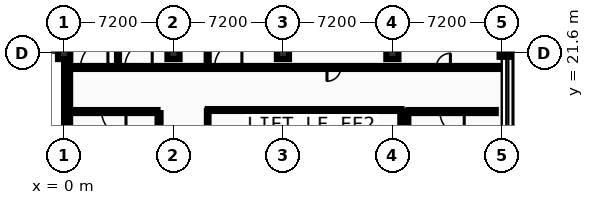
"""IFC4 building model, lengths in metres.
Left out: names, types, materials, properties, quantities, classifications, styles, units other than length and angle.
Written with IfcOpenShell. Run it as: python <this file> out.ifc"""

import sys

from ifc_helpers import new_model, si_unit, direction, frame, frame_2d, origin, origin_2d, place, context, subcontext, project, spatial, rectangle, i_section, extrude, element, fill, save


model = new_model("IFC4")
c1 = context("Model", 3, precision=1e-05, world=origin(), true_north=direction((0.0, 1.0)))
c2 = subcontext(c1, "Body", "Model", "MODEL_VIEW")
j1 = project(units=[si_unit("LENGTHUNIT", "METRE"), si_unit("PLANEANGLEUNIT", "RADIAN")], contexts=[c1])
p1 = place(None, origin())
s1 = spatial("IfcSite", under=j1, at=p1, CompositionType="ELEMENT")
p2 = place(p1, origin())
s2 = spatial("IfcBuilding", under=s1, at=p2, CompositionType="ELEMENT")
p3 = place(p2, frame((0.0, 0.0, -4.8)))
s3 = spatial("IfcBuildingStorey", under=s2, at=p3, CompositionType="ELEMENT", Elevation=-4.8)
for number, where, z_axis, x_axis in (
    (1, (0.0, 21.6, 0.0), (0.0, 0.0, 1.0), (1.0, 0.0, 0.0)),
    (2, (7.2, 21.6, 0.0), (0.0, 0.0, 1.0), (1.0, 0.0, 0.0)),
    (3, (14.4, 21.6, 0.0), (0.0, 0.0, 1.0), (1.0, 0.0, 0.0)),
    (4, (21.6, 21.6, 0.0), (0.0, 0.0, 1.0), (1.0, 0.0, 0.0)),
):
    element("IfcColumn", number, at=place(p3, frame(where, z_axis=z_axis, x_axis=x_axis)), inside=s3, PredefinedType="COLUMN", context=c2, shape_type="SweptSolid", body=[
        extrude(rectangle(XDim=0.8, YDim=0.8, at=origin_2d()), origin(), (0.0, 0.0, 1.0), 4.8),
    ])
for number, where, z_axis, x_axis in (
    (5, (28.8, 21.6, 0.0), (0.0, 0.0, 1.0), (1.0, 0.0, 0.0)),
    (6, (29.52, 21.6, 0.0), (0.0, 0.0, 1.0), (1.0, 0.0, 0.0)),
):
    element("IfcColumn", number, at=place(p3, frame(where, z_axis=z_axis, x_axis=x_axis)), inside=s3, PredefinedType="COLUMN", context=c2, shape_type="SweptSolid", body=[
        extrude(i_section(OverallWidth=0.3, OverallDepth=0.5, WebThickness=0.014, FlangeThickness=0.028, FilletRadius=0.027, at=origin_2d()), origin(), (0.0, 0.0, 1.0), 4.8),
    ])
p4 = place(p3, frame((0.2, 81.6, 0.0), z_axis=(0.0, 0.0, 1.0), x_axis=(0.0, -1.0, 0.0)))
e7 = element("IfcWall", 7, at=p4, inside=s3, PredefinedType="USERDEFINED", context=c2, shape_type="SweptSolid", body=[
    extrude(rectangle(XDim=81.2, YDim=0.4, at=frame_2d((40.6, 0.0))), origin(), (0.0, 0.0, 1.0), 4.545),
])
p5 = place(p3, frame((0.4, 17.75, 0.0), z_axis=(0.0, 0.0, 1.0), x_axis=(1.0, 0.0, 0.0)))
e8 = element("IfcWall", 8, at=p5, inside=s3, PredefinedType="PARTITIONING", context=c2, shape_type="SweptSolid", body=[
    extrude(rectangle(XDim=5.75, YDim=0.2, at=frame_2d((2.875, 0.0))), origin(), (0.0, 0.0, 1.0), 4.545),
])
p6 = place(p5, frame((2.075, 0.0, 0.0)))
e9 = element("IfcOpeningElement", 9, at=p6, cuts=e8, PredefinedType="OPENING", context=c2, shape_type="SweptSolid", body=[
    extrude(rectangle(XDim=1.6, YDim=2.2, at=frame_2d((0.8, 1.1))), frame((0.0, 0.11, 0.0), z_axis=(0.0, -1.0, 0.0), x_axis=(1.0, 0.0, 0.0)), (0.0, 0.0, 1.0), 0.22),
])
p7 = place(p3, frame((6.25, 14.45, 0.0), z_axis=(0.0, 0.0, 1.0), x_axis=(0.0, 1.0, 0.0)))
e10 = element("IfcWall", 10, at=p7, inside=s3, PredefinedType="PARTITIONING", context=c2, shape_type="SweptSolid", body=[
    extrude(rectangle(XDim=3.2, YDim=0.2, at=frame_2d((1.6, 0.0))), origin(), (0.0, 0.0, 1.0), 4.545),
])
p8 = place(p3, frame((22.65, 17.75, 0.0), z_axis=(0.0, 0.0, 1.0), x_axis=(1.0, 0.0, 0.0)))
e11 = element("IfcWall", 11, at=p8, inside=s3, PredefinedType="PARTITIONING", context=c2, shape_type="SweptSolid", body=[
    extrude(rectangle(XDim=5.75, YDim=0.2, at=frame_2d((2.875, 0.0))), origin(), (0.0, 0.0, 1.0), 4.545),
])
p9 = place(p8, frame((2.075, 0.0, 0.0)))
e12 = element("IfcOpeningElement", 12, at=p9, cuts=e11, PredefinedType="OPENING", context=c2, shape_type="SweptSolid", body=[
    extrude(rectangle(XDim=1.6, YDim=2.2, at=frame_2d((0.8, 1.1))), frame((0.0, 0.11, 0.0), z_axis=(0.0, -1.0, 0.0), x_axis=(1.0, 0.0, 0.0)), (0.0, 0.0, 1.0), 0.22),
])
p10 = place(p3, frame((22.55, 14.45, 0.0), z_axis=(0.0, 0.0, 1.0), x_axis=(0.0, 1.0, 0.0)))
e13 = element("IfcWall", 13, at=p10, inside=s3, PredefinedType="PARTITIONING", context=c2, shape_type="SweptSolid", body=[
    extrude(rectangle(XDim=3.2, YDim=0.2, at=frame_2d((1.6, 0.0))), origin(), (0.0, 0.0, 1.0), 4.545),
])
p11 = place(p3, frame((9.45, 17.85, 0.0), z_axis=(0.0, 0.0, 1.0), x_axis=(1.0, 0.0, 0.0)))
e14 = element("IfcWall", 14, at=p11, inside=s3, PredefinedType="PARTITIONING", context=c2, shape_type="SweptSolid", body=[
    extrude(rectangle(XDim=12.75, YDim=0.125, at=frame_2d((6.375, 0.0))), origin(), (0.0, 0.0, 1.0), 4.545),
])
p12 = place(p11, frame((1.225, 0.0, 0.0)))
e15 = element("IfcOpeningElement", 15, at=p12, cuts=e14, PredefinedType="OPENING", context=c2, shape_type="SweptSolid", body=[
    extrude(rectangle(XDim=1.0, YDim=2.1, at=frame_2d((0.5, 1.05))), frame((0.0, 0.073, 0.0), z_axis=(0.0, -1.0, 0.0), x_axis=(1.0, 0.0, 0.0)), (0.0, 0.0, 1.0), 0.145),
])
p13 = place(p11, frame((6.25, 0.0, 0.0)))
e16 = element("IfcOpeningElement", 16, at=p13, cuts=e14, PredefinedType="OPENING", context=c2, shape_type="SweptSolid", body=[
    extrude(rectangle(XDim=0.9, YDim=2.1, at=frame_2d((0.45, 1.05))), frame((0.0, 0.073, 0.0), z_axis=(0.0, -1.0, 0.0), x_axis=(1.0, 0.0, 0.0)), (0.0, 0.0, 1.0), 0.145),
])
p14 = place(p11, frame((8.05, 0.0, 0.0)))
e17 = element("IfcOpeningElement", 17, at=p14, cuts=e14, PredefinedType="OPENING", context=c2, shape_type="SweptSolid", body=[
    extrude(rectangle(XDim=0.88, YDim=2.04, at=frame_2d((0.44, 1.02))), frame((0.0, 0.073, 0.0), z_axis=(0.0, -1.0, 0.0), x_axis=(1.0, 0.0, 0.0)), (0.0, 0.0, 1.0), 0.145),
])
p15 = place(p3, frame((0.42, 20.65, 0.0), z_axis=(0.0, 0.0, 1.0), x_axis=(1.0, 0.0, 0.0)))
e18 = element("IfcWall", 18, at=p15, inside=s3, PredefinedType="PARTITIONING", context=c2, shape_type="SweptSolid", body=[
    extrude(rectangle(XDim=28.18, YDim=0.2, at=frame_2d((14.09, 0.0))), origin(), (0.0, 0.0, 1.0), 4.545),
])
p16 = place(p15, frame((0.665, 0.0, 0.0)))
e19 = element("IfcOpeningElement", 19, at=p16, cuts=e18, PredefinedType="OPENING", context=c2, shape_type="SweptSolid", body=[
    extrude(rectangle(XDim=1.8, YDim=2.3, at=frame_2d((0.9, 1.15))), frame((0.0, 0.11, 0.0), z_axis=(0.0, -1.0, 0.0), x_axis=(1.0, 0.0, 0.0)), (0.0, 0.0, 1.0), 0.22),
])
p17 = place(p15, frame((9.48, 0.0, 0.0)))
e20 = element("IfcOpeningElement", 20, at=p17, cuts=e18, PredefinedType="OPENING", context=c2, shape_type="SweptSolid", body=[
    extrude(rectangle(XDim=1.8, YDim=2.3, at=frame_2d((0.9, 1.15))), frame((0.0, 0.11, 0.0), z_axis=(0.0, -1.0, 0.0), x_axis=(1.0, 0.0, 0.0)), (0.0, 0.0, 1.0), 0.22),
])
p18 = place(p15, frame((3.58, 0.0, 0.0)))
e21 = element("IfcOpeningElement", 21, at=p18, cuts=e18, PredefinedType="OPENING", context=c2, shape_type="SweptSolid", body=[
    extrude(rectangle(XDim=1.8, YDim=2.3, at=frame_2d((0.9, 1.15))), frame((0.0, 0.11, 0.0), z_axis=(0.0, -1.0, 0.0), x_axis=(1.0, 0.0, 0.0)), (0.0, 0.0, 1.0), 0.22),
])
p19 = place(p15, frame((16.877, 0.0, 0.0)))
e22 = element("IfcOpeningElement", 22, at=p19, cuts=e18, PredefinedType="OPENING", context=c2, shape_type="SweptSolid", body=[
    extrude(rectangle(XDim=0.906, YDim=2.04, at=frame_2d((0.453, 1.02))), frame((0.0, 0.11, 0.0), z_axis=(0.0, -1.0, 0.0), x_axis=(1.0, 0.0, 0.0)), (0.0, 0.0, 1.0), 0.22),
])
p20 = place(p15, frame((24.064, 0.0, 0.0)))
e23 = element("IfcOpeningElement", 23, at=p20, cuts=e18, PredefinedType="OPENING", context=c2, shape_type="SweptSolid", body=[
    extrude(rectangle(XDim=0.932, YDim=2.04, at=frame_2d((0.466, 1.02))), frame((0.0, 0.11, 0.0), z_axis=(0.0, -1.0, 0.0), x_axis=(1.0, 0.0, 0.0)), (0.0, 0.0, 1.0), 0.22),
])
p21 = place(p3, frame((3.55, 20.75, 0.0), z_axis=(0.0, 0.0, 1.0), x_axis=(0.0, 1.0, 0.0)))
e24 = element("IfcWall", 24, at=p21, inside=s3, PredefinedType="PARTITIONING", context=c2, shape_type="SweptSolid", body=[
    extrude(rectangle(XDim=29.35, YDim=0.135, at=frame_2d((14.675, 0.0))), origin(), (0.0, 0.0, 1.0), 4.545),
])
p22 = place(p3, frame((9.45, 3.36, 0.0), z_axis=(0.0, 0.0, 1.0), x_axis=(0.0, 1.0, 0.0)))
e25 = element("IfcWall", 25, at=p22, inside=s3, PredefinedType="PARTITIONING", context=c2, shape_type="SweptSolid", body=[
    extrude(rectangle(XDim=14.427, YDim=0.11, at=frame_2d((7.214, 0.0))), origin(), (0.0, 0.0, 1.0), 4.235),
])
p23 = place(p3, frame((9.45, 20.75, 0.0), z_axis=(0.0, 0.0, 1.0), x_axis=(0.0, 1.0, 0.0)))
e26 = element("IfcWall", 26, at=p23, inside=s3, PredefinedType="PARTITIONING", context=c2, shape_type="SweptSolid", body=[
    extrude(rectangle(XDim=29.35, YDim=0.135, at=frame_2d((14.675, 0.0))), origin(), (0.0, 0.0, 1.0), 4.235),
])
p24 = place(p3, frame((12.9, 0.4, 0.0), z_axis=(0.0, 0.0, 1.0), x_axis=(0.0, 1.0, 0.0)))
e27 = element("IfcWall", 27, at=p24, inside=s3, PredefinedType="PARTITIONING", context=c2, shape_type="SweptSolid", body=[
    extrude(rectangle(XDim=17.388, YDim=0.125, at=frame_2d((8.694, 0.0))), origin(), (0.0, 0.0, 1.0), 4.545),
])
p25 = place(p3, frame((17.05, 0.4, 0.0), z_axis=(0.0, 0.0, 1.0), x_axis=(0.0, 1.0, 0.0)))
e28 = element("IfcWall", 28, at=p25, inside=s3, PredefinedType="PARTITIONING", context=c2, shape_type="SweptSolid", body=[
    extrude(rectangle(XDim=17.388, YDim=0.11, at=frame_2d((8.694, 0.0))), origin(), (0.0, 0.0, 1.0), 4.545),
])
p26 = place(p3, frame((22.2, 14.65, 0.0), z_axis=(0.0, 0.0, 1.0), x_axis=(0.0, 1.0, 0.0)))
e29 = element("IfcWall", 29, at=p26, inside=s3, PredefinedType="PARTITIONING", context=c2, shape_type="SweptSolid", body=[
    extrude(rectangle(XDim=3.138, YDim=0.16, at=frame_2d((1.569, 0.0))), origin(), (0.0, 0.0, 1.0), 4.545),
])
p27 = place(p6, origin())
e30 = element("IfcDoor", 30, at=p27, inside=s3, OperationType="DOUBLE_DOOR_SINGLE_SWING", PredefinedType="DOOR", context=c2, shape_type="SweptSolid", body=[
    extrude(rectangle(XDim=1.6, YDim=2.2, at=frame_2d((0.8, 1.1))), frame((0.0, 0.025, 0.0), z_axis=(0.0, -1.0, 0.0), x_axis=(1.0, 0.0, 0.0)), (0.0, 0.0, 1.0), 0.05),
])
fill(e9, e30)
p28 = place(p9, origin())
e31 = element("IfcDoor", 31, at=p28, inside=s3, OperationType="DOUBLE_DOOR_SINGLE_SWING", PredefinedType="DOOR", context=c2, shape_type="SweptSolid", body=[
    extrude(rectangle(XDim=1.6, YDim=2.2, at=frame_2d((0.8, 1.1))), frame((0.0, 0.025, 0.0), z_axis=(0.0, -1.0, 0.0), x_axis=(1.0, 0.0, 0.0)), (0.0, 0.0, 1.0), 0.05),
])
fill(e12, e31)
p29 = place(p12, origin())
e32 = element("IfcDoor", 32, at=p29, inside=s3, OperationType="SLIDING_TO_LEFT", PredefinedType="DOOR", context=c2, shape_type="SweptSolid", body=[
    extrude(rectangle(XDim=1.0, YDim=2.1, at=frame_2d((0.5, 1.05))), frame((0.0, 0.025, 0.0), z_axis=(0.0, -1.0, 0.0), x_axis=(1.0, 0.0, 0.0)), (0.0, 0.0, 1.0), 0.05),
])
fill(e15, e32)
p30 = place(p13, origin())
e33 = element("IfcDoor", 33, at=p30, inside=s3, OperationType="SINGLE_SWING_RIGHT", PredefinedType="DOOR", context=c2, shape_type="SweptSolid", body=[
    extrude(rectangle(XDim=0.9, YDim=2.1, at=frame_2d((0.45, 1.05))), frame((0.0, 0.025, 0.0), z_axis=(0.0, -1.0, 0.0), x_axis=(1.0, 0.0, 0.0)), (0.0, 0.0, 1.0), 0.05),
])
fill(e16, e33)
p31 = place(p14, origin())
e34 = element("IfcDoor", 34, at=p31, inside=s3, OperationType="SINGLE_SWING_RIGHT", PredefinedType="DOOR", context=c2, shape_type="SweptSolid", body=[
    extrude(rectangle(XDim=0.88, YDim=2.04, at=frame_2d((0.44, 1.02))), frame((0.0, 0.025, 0.0), z_axis=(0.0, -1.0, 0.0), x_axis=(1.0, 0.0, 0.0)), (0.0, 0.0, 1.0), 0.05),
])
fill(e17, e34)
p32 = place(p16, frame((1.8, 0.0, 0.0), z_axis=(0.0, 0.0, 1.0), x_axis=(-1.0, 0.0, 0.0)))
e35 = element("IfcDoor", 35, at=p32, inside=s3, OperationType="DOUBLE_DOOR_SINGLE_SWING", PredefinedType="DOOR", context=c2, shape_type="SweptSolid", body=[
    extrude(rectangle(XDim=1.8, YDim=2.3, at=frame_2d((0.9, 1.15))), frame((0.0, 0.025, 0.0), z_axis=(0.0, -1.0, 0.0), x_axis=(1.0, 0.0, 0.0)), (0.0, 0.0, 1.0), 0.05),
])
fill(e19, e35)
p33 = place(p17, frame((1.8, 0.0, 0.0), z_axis=(0.0, 0.0, 1.0), x_axis=(-1.0, 0.0, 0.0)))
e36 = element("IfcDoor", 36, at=p33, inside=s3, OperationType="DOUBLE_DOOR_SINGLE_SWING", PredefinedType="DOOR", context=c2, shape_type="SweptSolid", body=[
    extrude(rectangle(XDim=1.8, YDim=2.3, at=frame_2d((0.9, 1.15))), frame((0.0, 0.025, 0.0), z_axis=(0.0, -1.0, 0.0), x_axis=(1.0, 0.0, 0.0)), (0.0, 0.0, 1.0), 0.05),
])
fill(e20, e36)
p34 = place(p18, frame((1.8, 0.0, 0.0), z_axis=(0.0, 0.0, 1.0), x_axis=(-1.0, 0.0, 0.0)))
e37 = element("IfcDoor", 37, at=p34, inside=s3, OperationType="DOUBLE_DOOR_SINGLE_SWING", PredefinedType="DOOR", context=c2, shape_type="SweptSolid", body=[
    extrude(rectangle(XDim=1.8, YDim=2.3, at=frame_2d((0.9, 1.15))), frame((0.0, 0.025, 0.0), z_axis=(0.0, -1.0, 0.0), x_axis=(1.0, 0.0, 0.0)), (0.0, 0.0, 1.0), 0.05),
])
fill(e21, e37)
p35 = place(p19, frame((0.906, 0.0, 0.0), z_axis=(0.0, 0.0, 1.0), x_axis=(-1.0, 0.0, 0.0)))
e38 = element("IfcDoor", 38, at=p35, inside=s3, OperationType="SINGLE_SWING_LEFT", PredefinedType="DOOR", context=c2, shape_type="SweptSolid", body=[
    extrude(rectangle(XDim=0.906, YDim=2.04, at=frame_2d((0.453, 1.02))), frame((0.0, 0.025, 0.0), z_axis=(0.0, -1.0, 0.0), x_axis=(1.0, 0.0, 0.0)), (0.0, 0.0, 1.0), 0.05),
])
fill(e22, e38)
p36 = place(p20, frame((0.932, 0.0, 0.0), z_axis=(0.0, 0.0, 1.0), x_axis=(-1.0, 0.0, 0.0)))
e39 = element("IfcDoor", 39, at=p36, inside=s3, OperationType="SINGLE_SWING_RIGHT", PredefinedType="DOOR", context=c2, shape_type="SweptSolid", body=[
    extrude(rectangle(XDim=0.932, YDim=2.04, at=frame_2d((0.466, 1.02))), frame((0.0, 0.025, 0.0), z_axis=(0.0, -1.0, 0.0), x_axis=(1.0, 0.0, 0.0)), (0.0, 0.0, 1.0), 0.05),
])
fill(e23, e39)
save(model, sys.argv[1])
